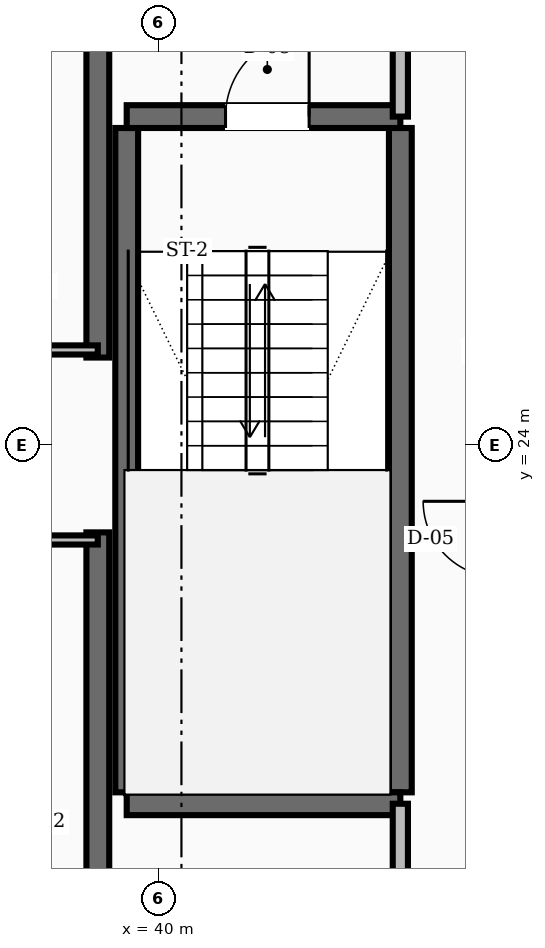
"""IFC4 building model, lengths in metres.
Left out: names, types, materials, properties, quantities, classifications, styles, units other than length and angle.
Written with IfcOpenShell. Run it as: python <this file> out.ifc"""

import sys

from ifc_helpers import new_model, si_unit, direction, frame, frame_2d, origin, place, context, subcontext, project, spatial, rectangle, extrude, element, fill, save


model = new_model("IFC4")
c1 = context("Model", 3, precision=1e-05, world=origin(), true_north=direction((0.0, 1.0)))
c2 = subcontext(c1, "Body", "Model", "MODEL_VIEW")
j1 = project(units=[si_unit("LENGTHUNIT", "METRE"), si_unit("PLANEANGLEUNIT", "RADIAN")], contexts=[c1])
p1 = place(None, origin())
s1 = spatial("IfcSite", under=j1, at=p1, CompositionType="ELEMENT")
p2 = place(p1, origin())
s2 = spatial("IfcBuilding", under=s1, at=p2, CompositionType="ELEMENT")
p3 = place(p2, frame((0.0, 0.0, 261.6)))
s3 = spatial("IfcBuildingStorey", under=s2, at=p3, CompositionType="ELEMENT", Elevation=261.6)
for number, where, z_axis, x_axis in (
    (1, (39.2, 16.55, 0.0), (0.0, 0.0, 1.0), (0.0, 1.0, 0.0)),
    (2, (39.2, 25.15, 0.0), (0.0, 0.0, 1.0), (0.0, 1.0, 0.0)),
):
    element("IfcWall", number, at=place(p3, frame(where, z_axis=z_axis, x_axis=x_axis)), inside=s3, PredefinedType="SHEAR", context=c2, shape_type="SweptSolid", body=[
        extrude(rectangle(XDim=6.3, YDim=0.3, at=frame_2d((3.15, 0.0))), origin(), (0.0, 0.0, 1.0), 3.6),
    ])
for number, where, z_axis, x_axis in (
    (3, (43.18, 19.43, 0.0), (0.0, 0.0, 1.0), (0.0, 1.0, 0.0)),
    (4, (39.58, 19.43, 0.0), (0.0, 0.0, 1.0), (0.0, 1.0, 0.0)),
):
    element("IfcWall", number, at=place(p3, frame(where, z_axis=z_axis, x_axis=x_axis)), inside=s3, PredefinedType="SHEAR", context=c2, shape_type="SweptSolid", body=[
        extrude(rectangle(XDim=8.74, YDim=0.3, at=frame_2d((4.37, 0.0))), origin(), (0.0, 0.0, 1.0), 3.6),
    ])
p4 = place(p3, frame((39.58, 19.28, 0.0), z_axis=(0.0, 0.0, 1.0), x_axis=(1.0, 0.0, 0.0)))
e5 = element("IfcWall", 5, at=p4, inside=s3, PredefinedType="SHEAR", context=c2, shape_type="SweptSolid", body=[
    extrude(rectangle(XDim=3.6, YDim=0.3, at=frame_2d((1.8, 0.0))), origin(), (0.0, 0.0, 1.0), 3.6),
])
p5 = place(p3, frame((39.58, 28.32, 0.0), z_axis=(0.0, 0.0, 1.0), x_axis=(1.0, 0.0, 0.0)))
e6 = element("IfcWall", 6, at=p5, inside=s3, PredefinedType="SHEAR", context=c2, shape_type="SweptSolid", body=[
    extrude(rectangle(XDim=3.6, YDim=0.3, at=frame_2d((1.8, 0.0))), origin(), (0.0, 0.0, 1.0), 3.6),
])
p6 = place(p5, frame((1.3, 0.0, 0.0)))
e7 = element("IfcOpeningElement", 7, at=p6, cuts=e6, PredefinedType="OPENING", context=c2, shape_type="SweptSolid", body=[
    extrude(rectangle(XDim=1.1, YDim=2.1, at=frame_2d((0.55, 1.05))), frame((0.0, 0.16, 0.0), z_axis=(0.0, -1.0, 0.0), x_axis=(1.0, 0.0, 0.0)), (0.0, 0.0, 1.0), 0.32),
])
p7 = place(p3, frame((43.18, 28.32, 0.0), z_axis=(0.0, 0.0, 1.0), x_axis=(0.0, 1.0, 0.0)))
e8 = element("IfcWall", 8, at=p7, inside=s3, PredefinedType="SOLIDWALL", context=c2, shape_type="SweptSolid", body=[
    extrude(rectangle(XDim=3.13, YDim=0.2, at=frame_2d((1.565, 0.0))), origin(), (0.0, 0.0, 1.0), 2.87),
])
p8 = place(p7, frame((1.015, 0.0, 0.0)))
e9 = element("IfcOpeningElement", 9, at=p8, cuts=e8, PredefinedType="OPENING", context=c2, shape_type="SweptSolid", body=[
    extrude(rectangle(XDim=1.1, YDim=2.1, at=frame_2d((0.55, 1.05))), frame((0.0, 0.11, 0.0), z_axis=(0.0, -1.0, 0.0), x_axis=(1.0, 0.0, 0.0)), (0.0, 0.0, 1.0), 0.22),
])
p9 = place(p3, frame((43.18, 16.55, 0.0), z_axis=(0.0, 0.0, 1.0), x_axis=(0.0, 1.0, 0.0)))
e10 = element("IfcWall", 10, at=p9, inside=s3, PredefinedType="SOLIDWALL", context=c2, shape_type="SweptSolid", body=[
    extrude(rectangle(XDim=2.73, YDim=0.2, at=frame_2d((1.365, 0.0))), origin(), (0.0, 0.0, 1.0), 2.87),
])
p10 = place(p9, frame((0.89, 0.0, 0.0)))
e11 = element("IfcOpeningElement", 11, at=p10, cuts=e10, PredefinedType="OPENING", context=c2, shape_type="SweptSolid", body=[
    extrude(rectangle(XDim=0.95, YDim=2.1, at=frame_2d((0.475, 1.05))), frame((0.0, 0.11, 0.0), z_axis=(0.0, -1.0, 0.0), x_axis=(1.0, 0.0, 0.0)), (0.0, 0.0, 1.0), 0.22),
])
for number, where, z_axis, x_axis in (
    (12, (37.4, 25.25, 0.0), (0.0, 0.0, 1.0), (1.0, 0.0, 0.0)),
    (13, (37.4, 22.75, 0.0), (0.0, 0.0, 1.0), (1.0, 0.0, 0.0)),
):
    element("IfcWall", number, at=place(p3, frame(where, z_axis=z_axis, x_axis=x_axis)), inside=s3, PredefinedType="PARTITIONING", context=c2, shape_type="SweptSolid", body=[
        extrude(rectangle(XDim=1.8, YDim=0.12, at=frame_2d((0.9, 0.0))), origin(), (0.0, 0.0, 1.0), 2.87),
    ])
p11 = place(p6, origin())
e14 = element("IfcDoor", 14, at=p11, inside=s3, OperationType="SINGLE_SWING_RIGHT", PredefinedType="DOOR", context=c2, shape_type="SweptSolid", body=[
    extrude(rectangle(XDim=1.1, YDim=2.1, at=frame_2d((0.55, 1.05))), frame((0.0, 0.025, 0.0), z_axis=(0.0, -1.0, 0.0), x_axis=(1.0, 0.0, 0.0)), (0.0, 0.0, 1.0), 0.05),
])
fill(e7, e14)
save(model, sys.argv[1])
